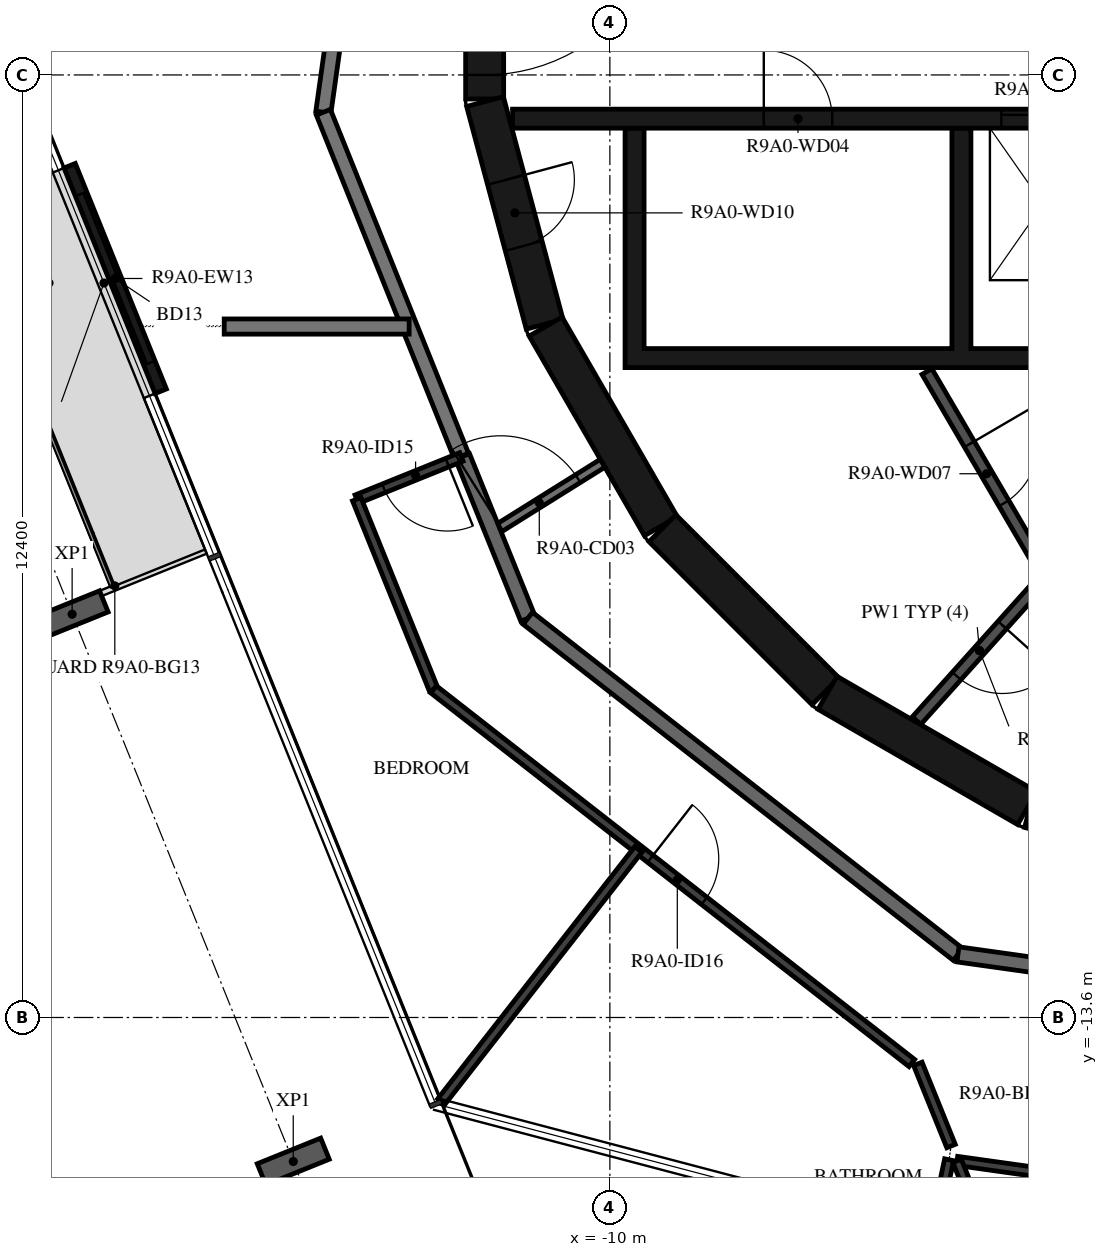
"""IFC4 building model, lengths in metres.
Left out: names, types, materials, properties, quantities, classifications, styles, units other than length and angle.
Written with IfcOpenShell. Run it as: python <this file> out.ifc"""

import sys

from ifc_helpers import new_model, si_unit, direction, frame, frame_2d, origin, origin_2d, place, context, subcontext, project, spatial, polyline, rectangle, i_section, outline, extrude, element, fill, save


model = new_model("IFC4")
c1 = context("Model", 3, precision=1e-05, world=origin(), true_north=direction((0.0, 1.0)))
c2 = subcontext(c1, "Body", "Model", "MODEL_VIEW")
j1 = project(units=[si_unit("LENGTHUNIT", "METRE"), si_unit("PLANEANGLEUNIT", "RADIAN")], contexts=[c1])
p1 = place(None, origin())
s1 = spatial("IfcSite", under=j1, at=p1, CompositionType="ELEMENT")
p2 = place(p1, origin())
s2 = spatial("IfcBuilding", under=s1, at=p2, CompositionType="ELEMENT")
p3 = place(p2, frame((0.0, 0.0, 340.0)))
s3 = spatial("IfcBuildingStorey", under=s2, at=p3, CompositionType="ELEMENT", Elevation=340.0)
for number, where, z_axis, x_axis in (
    (1, (-17.075, -8.294, -0.38), (0.0, 0.0, 1.0), (-0.375, 0.927, 0.0)),
    (2, (-14.166, -15.495, -0.38), (0.0, 0.0, 1.0), (-0.375, 0.927, 0.0)),
):
    element("IfcColumn", number, at=place(p3, frame(where, z_axis=z_axis, x_axis=x_axis)), inside=s3, PredefinedType="COLUMN", context=c2, shape_type="SweptSolid", body=[
        extrude(i_section(OverallWidth=0.3, OverallDepth=0.9, WebThickness=0.019, FlangeThickness=0.035, FilletRadius=0.03, at=origin_2d()), origin(), (0.0, 0.0, 1.0), 3.5),
    ])
p4 = place(p3, frame((-17.107, -2.394, 0.0), z_axis=(0.0, 0.0, 1.0), x_axis=(0.374598019739, -0.927187318511, 0.0)))
e3 = element("IfcWall", 3, at=p4, inside=s3, PredefinedType="STANDARD", context=c2, shape_type="SweptSolid", body=[
    extrude(rectangle(XDim=3.2, YDim=0.16, at=frame_2d((1.6, 0.0))), origin(), (0.0, 0.0, 1.0), 3.12),
])
p5 = place(p4, frame((0.4, 0.0, 0.0)))
e4 = element("IfcOpeningElement", 4, at=p5, cuts=e3, PredefinedType="OPENING", context=c2, shape_type="SweptSolid", body=[
    extrude(rectangle(XDim=2.4, YDim=2.4, at=frame_2d((1.2, 1.2))), frame((0.0, 0.09, 0.0), z_axis=(0.0, -1.0, 0.0), x_axis=(1.0, 0.0, 0.0)), (0.0, 0.0, 1.0), 0.18),
])
p6 = place(p3, frame((-11.647, 1.516, 0.0), z_axis=(0.0, 0.0, 1.0), x_axis=(0.0, -1.0, 0.0)))
e5 = element("IfcWall", 5, at=p6, inside=s3, PredefinedType="SHEAR", context=c2, shape_type="SweptSolid", body=[
    extrude(rectangle(XDim=3.033, YDim=0.5, at=frame_2d((1.516, 0.0))), origin(), (0.0, 0.0, 1.0), 3.12),
])
p7 = place(p6, frame((0.316, 0.0, 0.0)))
e6 = element("IfcOpeningElement", 6, at=p7, cuts=e5, PredefinedType="OPENING", context=c2, shape_type="SweptSolid", body=[
    extrude(rectangle(XDim=2.4, YDim=2.1, at=frame_2d((1.2, 1.05))), frame((0.0, 0.26, 0.0), z_axis=(0.0, -1.0, 0.0), x_axis=(1.0, 0.0, 0.0)), (0.0, 0.0, 1.0), 0.52),
])
p8 = place(p3, frame((-11.643, -1.55, 0.0), z_axis=(0.0, 0.0, 1.0), x_axis=(0.258734743916, -0.965948410781, 0.0)))
e7 = element("IfcWall", 7, at=p8, inside=s3, PredefinedType="SHEAR", context=c2, shape_type="SweptSolid", body=[
    extrude(rectangle(XDim=3.033, YDim=0.5, at=frame_2d((1.516, 0.0))), origin(), (0.0, 0.0, 1.0), 3.12),
])
p9 = place(p8, frame((1.066, 0.0, 0.0)))
e8 = element("IfcOpeningElement", 8, at=p9, cuts=e7, PredefinedType="OPENING", context=c2, shape_type="SweptSolid", body=[
    extrude(rectangle(XDim=0.9, YDim=2.1, at=frame_2d((0.45, 1.05))), frame((0.0, 0.26, 0.0), z_axis=(0.0, -1.0, 0.0), x_axis=(1.0, 0.0, 0.0)), (0.0, 0.0, 1.0), 0.52),
])
p10 = place(p3, frame((-10.845, -4.51, 0.0), z_axis=(0.0, 0.0, 1.0), x_axis=(0.500087131594, -0.865975092491, 0.0)))
e9 = element("IfcWall", 9, at=p10, inside=s3, PredefinedType="SHEAR", context=c2, shape_type="SweptSolid", body=[
    extrude(rectangle(XDim=3.033, YDim=0.5, at=frame_2d((1.516, 0.0))), origin(), (0.0, 0.0, 1.0), 3.12),
])
p11 = place(p3, frame((-9.308, -7.164, 0.0), z_axis=(0.0, 0.0, 1.0), x_axis=(0.707106781187, -0.707106781187, 0.0)))
e10 = element("IfcWall", 10, at=p11, inside=s3, PredefinedType="SHEAR", context=c2, shape_type="SweptSolid", body=[
    extrude(rectangle(XDim=3.032, YDim=0.5, at=frame_2d((1.516, 0.0))), origin(), (0.0, 0.0, 1.0), 3.12),
])
for number, where, z_axis, x_axis in (
    (11, (-7.137, -9.329, 0.0), (0.0, 0.0, 1.0), (0.866, -0.5, 0.0)),
    (12, (-4.479, -10.858, 0.0), (0.0, 0.0, 1.0), (0.966, -0.259, 0.0)),
):
    element("IfcWall", number, at=place(p3, frame(where, z_axis=z_axis, x_axis=x_axis)), inside=s3, PredefinedType="SHEAR", context=c2, shape_type="SweptSolid", body=[
        extrude(rectangle(XDim=3.033, YDim=0.5, at=frame_2d((1.516, 0.0))), origin(), (0.0, 0.0, 1.0), 3.12),
    ])
p12 = place(p3, origin())
e13 = element("IfcWall", 13, at=p12, inside=s3, PredefinedType="SHEAR", context=c2, shape_type="SweptSolid", body=[
    extrude(outline(polyline([(9.8, -5.05), (9.8, -4.8), (9.8, -1.9), (9.55, -1.9), (9.55, -4.8), (7.65, -4.8), (7.65, -1.9), (7.4, -1.9), (7.4, -4.8), (5.5, -4.8), (5.5, -1.9), (5.25, -1.9), (5.25, -4.8), (3.35, -4.8), (3.35, -1.9), (3.1, -1.9), (3.1, -4.8), (1.2, -4.8), (1.2, -1.9), (0.95, -1.9), (0.95, -4.8), (-0.95, -4.8), (-0.95, -1.9), (-1.2, -1.9), (-1.2, -4.8), (-3.1, -4.8), (-3.1, -1.9), (-3.35, -1.9), (-3.35, -4.8), (-5.25, -4.8), (-5.25, -1.9), (-5.5, -1.9), (-5.5, -4.8), (-9.55, -4.8), (-9.55, -1.9), (-9.8, -1.9), (-9.8, -4.8), (-9.8, -5.05), (9.8, -5.05)])), origin(), (0.0, 0.0, 1.0), 3.12),
])
p13 = place(p3, frame((-11.28, -1.775, 0.0), z_axis=(0.0, 0.0, 1.0), x_axis=(1.0, 0.0, 0.0)))
e14 = element("IfcWall", 14, at=p13, inside=s3, PredefinedType="SHEAR", context=c2, shape_type="SweptSolid", body=[
    extrude(rectangle(XDim=14.38, YDim=0.25, at=frame_2d((7.19, 0.0))), origin(), (0.0, 0.0, 1.0), 3.12),
])
p14 = place(p13, frame((6.43, 0.0, 0.0)))
e15 = element("IfcOpeningElement", 15, at=p14, cuts=e14, PredefinedType="OPENING", context=c2, shape_type="SweptSolid", body=[
    extrude(rectangle(XDim=1.1, YDim=2.1, at=frame_2d((0.55, 1.05))), frame((0.0, 0.135, 0.0), z_axis=(0.0, -1.0, 0.0), x_axis=(1.0, 0.0, 0.0)), (0.0, 0.0, 1.0), 0.27),
])
p15 = place(p13, frame((8.58, 0.0, 0.0)))
e16 = element("IfcOpeningElement", 16, at=p15, cuts=e14, PredefinedType="OPENING", context=c2, shape_type="SweptSolid", body=[
    extrude(rectangle(XDim=1.1, YDim=2.1, at=frame_2d((0.55, 1.05))), frame((0.0, 0.135, 0.0), z_axis=(0.0, -1.0, 0.0), x_axis=(1.0, 0.0, 0.0)), (0.0, 0.0, 1.0), 0.27),
])
p16 = place(p13, frame((10.73, 0.0, 0.0)))
e17 = element("IfcOpeningElement", 17, at=p16, cuts=e14, PredefinedType="OPENING", context=c2, shape_type="SweptSolid", body=[
    extrude(rectangle(XDim=1.1, YDim=2.1, at=frame_2d((0.55, 1.05))), frame((0.0, 0.135, 0.0), z_axis=(0.0, -1.0, 0.0), x_axis=(1.0, 0.0, 0.0)), (0.0, 0.0, 1.0), 0.27),
])
p17 = place(p13, frame((3.305, 0.0, 0.0)))
e18 = element("IfcOpeningElement", 18, at=p17, cuts=e14, PredefinedType="OPENING", context=c2, shape_type="SweptSolid", body=[
    extrude(rectangle(XDim=0.9, YDim=2.1, at=frame_2d((0.45, 1.05))), frame((0.0, 0.135, 0.0), z_axis=(0.0, -1.0, 0.0), x_axis=(1.0, 0.0, 0.0)), (0.0, 0.0, 1.0), 0.27),
])
p18 = place(p13, frame((12.98, 0.0, 0.0)))
e19 = element("IfcOpeningElement", 19, at=p18, cuts=e14, PredefinedType="OPENING", context=c2, shape_type="SweptSolid", body=[
    extrude(rectangle(XDim=0.9, YDim=2.1, at=frame_2d((0.45, 1.05))), frame((0.0, 0.135, 0.0), z_axis=(0.0, -1.0, 0.0), x_axis=(1.0, 0.0, 0.0)), (0.0, 0.0, 1.0), 0.27),
])
p19 = place(p3, frame((-5.829, -5.102, 0.0), z_axis=(0.0, 0.0, 1.0), x_axis=(0.504480008384, -0.863423373057, 0.0)))
e20 = element("IfcWall", 20, at=p19, inside=s3, PredefinedType="PARTITIONING", context=c2, shape_type="SweptSolid", body=[
    extrude(rectangle(XDim=3.115, YDim=0.15, at=frame_2d((1.558, 0.0))), origin(), (0.0, 0.0, 1.0), 3.12),
])
p20 = place(p19, frame((1.107, 0.0, 0.0)))
e21 = element("IfcOpeningElement", 21, at=p20, cuts=e20, PredefinedType="OPENING", context=c2, shape_type="SweptSolid", body=[
    extrude(rectangle(XDim=0.9, YDim=2.1, at=frame_2d((0.45, 1.05))), frame((0.0, 0.085, 0.0), z_axis=(0.0, -1.0, 0.0), x_axis=(1.0, 0.0, 0.0)), (0.0, 0.0, 1.0), 0.17),
])
p21 = place(p3, frame((-4.311, -7.851, 0.0), z_axis=(0.0, 0.0, 1.0), x_axis=(-0.667869133096, -0.744278725383, 0.0)))
e22 = element("IfcWall", 22, at=p21, inside=s3, PredefinedType="PARTITIONING", context=c2, shape_type="SweptSolid", body=[
    extrude(rectangle(XDim=2.476, YDim=0.15, at=frame_2d((1.238, 0.0))), origin(), (0.0, 0.0, 1.0), 3.12),
])
p22 = place(p21, frame((0.788, 0.0, 0.0)))
e23 = element("IfcOpeningElement", 23, at=p22, cuts=e22, PredefinedType="OPENING", context=c2, shape_type="SweptSolid", body=[
    extrude(rectangle(XDim=0.9, YDim=2.1, at=frame_2d((0.45, 1.05))), frame((0.0, 0.085, 0.0), z_axis=(0.0, -1.0, 0.0), x_axis=(1.0, 0.0, 0.0)), (0.0, 0.0, 1.0), 0.17),
])
p23 = place(p3, frame((-11.539, -7.21, 0.0), z_axis=(0.0, 0.0, 1.0), x_axis=(0.848103039868, 0.529831325769, 0.0)))
e24 = element("IfcWall", 24, at=p23, inside=s3, PredefinedType="PARTITIONING", context=c2, shape_type="SweptSolid", body=[
    extrude(rectangle(XDim=1.702, YDim=0.12, at=frame_2d((0.851, 0.0))), origin(), (0.0, 0.0, 1.0), 3.12),
])
p24 = place(p23, frame((0.12, 0.0, 0.0)))
e25 = element("IfcOpeningElement", 25, at=p24, cuts=e24, PredefinedType="OPENING", context=c2, shape_type="SweptSolid", body=[
    extrude(rectangle(XDim=1.2, YDim=2.1, at=frame_2d((0.6, 1.05))), frame((0.0, 0.07, 0.0), z_axis=(0.0, -1.0, 0.0), x_axis=(1.0, 0.0, 0.0)), (0.0, 0.0, 1.0), 0.14),
])
p25 = place(p3, frame((-12.77, 5.42, 0.0), z_axis=(0.0, 0.0, 1.0), x_axis=(-0.139155334385, -0.990270565508, 0.0)))
e26 = element("IfcWall", 26, at=p25, inside=s3, PredefinedType="STANDARD", context=c2, shape_type="SweptSolid", body=[
    extrude(rectangle(XDim=7.181, YDim=0.2, at=frame_2d((3.59, 0.0))), origin(), (0.0, 0.0, 1.0), 3.12),
])
p26 = place(p25, frame((1.055, 0.0, 0.0)))
e27 = element("IfcOpeningElement", 27, at=p26, cuts=e26, PredefinedType="OPENING", context=c2, shape_type="SweptSolid", body=[
    extrude(rectangle(XDim=1.8, YDim=2.1, at=frame_2d((0.9, 1.05))), frame((0.0, 0.11, 0.0), z_axis=(0.0, -1.0, 0.0), x_axis=(1.0, 0.0, 0.0)), (0.0, 0.0, 1.0), 0.22),
])
p27 = place(p3, frame((-13.769, -1.691, 0.0), z_axis=(0.0, 0.0, 1.0), x_axis=(0.372720094028, -0.927943819155, 0.0)))
e28 = element("IfcWall", 28, at=p27, inside=s3, PredefinedType="STANDARD", context=c2, shape_type="SweptSolid", body=[
    extrude(rectangle(XDim=4.875, YDim=0.2, at=frame_2d((2.438, 0.0))), origin(), (0.0, 0.0, 1.0), 3.12),
])
p28 = place(p3, frame((-11.939, -6.22, 0.0), z_axis=(0.0, 0.0, 1.0), x_axis=(0.374651128394, -0.927165860024, 0.0)))
e29 = element("IfcWall", 29, at=p28, inside=s3, PredefinedType="STANDARD", context=c2, shape_type="SweptSolid", body=[
    extrude(rectangle(XDim=2.296, YDim=0.2, at=frame_2d((1.148, 0.0))), origin(), (0.0, 0.0, 1.0), 3.12),
])
p29 = place(p3, frame((-11.079, -8.349, 0.0), z_axis=(0.0, 0.0, 1.0), x_axis=(0.78800478687, -0.615669112324, 0.0)))
e30 = element("IfcWall", 30, at=p29, inside=s3, PredefinedType="STANDARD", context=c2, shape_type="SweptSolid", body=[
    extrude(rectangle(XDim=7.181, YDim=0.2, at=frame_2d((3.591, 0.0))), origin(), (0.0, 0.0, 1.0), 3.12),
])
p30 = place(p3, frame((-5.42, -12.77, 0.0), z_axis=(0.0, 0.0, 1.0), x_axis=(0.990270565508, -0.139155334385, 0.0)))
e31 = element("IfcWall", 31, at=p30, inside=s3, PredefinedType="STANDARD", context=c2, shape_type="SweptSolid", body=[
    extrude(rectangle(XDim=7.181, YDim=0.2, at=frame_2d((3.59, 0.0))), origin(), (0.0, 0.0, 1.0), 3.12),
])
p31 = place(p30, frame((2.39, 0.0, 0.0)))
e32 = element("IfcOpeningElement", 32, at=p31, cuts=e31, PredefinedType="OPENING", context=c2, shape_type="SweptSolid", body=[
    extrude(rectangle(XDim=1.0, YDim=2.1, at=frame_2d((0.5, 1.05))), frame((0.0, 0.11, 0.0), z_axis=(0.0, -1.0, 0.0), x_axis=(1.0, 0.0, 0.0)), (0.0, 0.0, 1.0), 0.22),
])
p32 = place(p30, frame((4.091, 0.0, 0.0)))
e33 = element("IfcOpeningElement", 33, at=p32, cuts=e31, PredefinedType="OPENING", context=c2, shape_type="SweptSolid", body=[
    extrude(rectangle(XDim=1.0, YDim=2.1, at=frame_2d((0.5, 1.05))), frame((0.0, 0.11, 0.0), z_axis=(0.0, -1.0, 0.0), x_axis=(1.0, 0.0, 0.0)), (0.0, 0.0, 1.0), 0.22),
])
p33 = place(p3, frame((-15.074, -4.51, 0.0), z_axis=(0.0, 0.0, 1.0), x_axis=(1.0, 0.0, 0.0)))
e34 = element("IfcWall", 34, at=p33, inside=s3, PredefinedType="STANDARD", context=c2, shape_type="SweptSolid", body=[
    extrude(rectangle(XDim=2.433, YDim=0.2, at=frame_2d((1.216, 0.0))), origin(), (0.0, 0.0, 1.0), 3.12),
])
p34 = place(p3, frame((-11.953, -6.225, 0.0), z_axis=(0.0, 0.0, 1.0), x_axis=(-0.927144096717, -0.374704982518, 0.0)))
e35 = element("IfcWall", 35, at=p34, inside=s3, PredefinedType="PARTITIONING", context=c2, shape_type="SweptSolid", body=[
    extrude(rectangle(XDim=1.485, YDim=0.12, at=frame_2d((0.742, 0.0))), origin(), (0.0, 0.0, 1.0), 3.12),
])
p35 = place(p34, frame((0.2, 0.0, 0.0)))
e36 = element("IfcOpeningElement", 36, at=p35, cuts=e35, PredefinedType="OPENING", context=c2, shape_type="SweptSolid", body=[
    extrude(rectangle(XDim=0.9, YDim=2.1, at=frame_2d((0.45, 1.05))), frame((0.0, 0.07, 0.0), z_axis=(0.0, -1.0, 0.0), x_axis=(1.0, 0.0, 0.0)), (0.0, 0.0, 1.0), 0.14),
])
p36 = place(p3, frame((-13.33, -6.782, 0.0), z_axis=(0.0, 0.0, 1.0), x_axis=(0.374602180132, -0.927185637637, 0.0)))
e37 = element("IfcWall", 37, at=p36, inside=s3, PredefinedType="PARTITIONING", context=c2, shape_type="SweptSolid", body=[
    extrude(rectangle(XDim=2.698, YDim=0.12, at=frame_2d((1.349, 0.0))), origin(), (0.0, 0.0, 1.0), 3.12),
])
p37 = place(p3, frame((-12.319, -9.283, 0.0), z_axis=(0.0, 0.0, 1.0), x_axis=(0.788000268464, -0.61567489546, 0.0)))
e38 = element("IfcWall", 38, at=p37, inside=s3, PredefinedType="PARTITIONING", context=c2, shape_type="SweptSolid", body=[
    extrude(rectangle(XDim=7.985, YDim=0.12, at=frame_2d((3.992, 0.0))), origin(), (0.0, 0.0, 1.0), 3.12),
])
p38 = place(p37, frame((3.619, 0.0, 0.0)))
e39 = element("IfcOpeningElement", 39, at=p38, cuts=e38, PredefinedType="OPENING", context=c2, shape_type="SweptSolid", body=[
    extrude(rectangle(XDim=0.9, YDim=2.1, at=frame_2d((0.45, 1.05))), frame((0.0, 0.07, 0.0), z_axis=(0.0, -1.0, 0.0), x_axis=(1.0, 0.0, 0.0)), (0.0, 0.0, 1.0), 0.14),
])
p39 = place(p3, frame((-5.948, -14.21, 0.0), z_axis=(0.0, 0.0, 1.0), x_axis=(0.374601530156, -0.927185900241, 0.0)))
e40 = element("IfcWall", 40, at=p39, inside=s3, PredefinedType="PARTITIONING", context=c2, shape_type="SweptSolid", body=[
    extrude(rectangle(XDim=1.166, YDim=0.12, at=frame_2d((0.583, 0.0))), origin(), (0.0, 0.0, 1.0), 3.12),
])
p40 = place(p3, frame((-5.433, -15.487, 0.0), z_axis=(0.0, 0.0, 1.0), x_axis=(0.990268451053, -0.139170380644, 0.0)))
e41 = element("IfcWall", 41, at=p40, inside=s3, PredefinedType="PARTITIONING", context=c2, shape_type="SweptSolid", body=[
    extrude(rectangle(XDim=1.595, YDim=0.12, at=frame_2d((0.797, 0.0))), origin(), (0.0, 0.0, 1.0), 3.12),
])
p41 = place(p3, frame((-12.219, -14.708, 0.0), z_axis=(0.0, 0.0, 1.0), x_axis=(0.615656413137, 0.788014708596, 0.0)))
e42 = element("IfcWall", 42, at=p41, inside=s3, PredefinedType="PARTITIONING", context=c2, shape_type="SweptSolid", body=[
    extrude(rectangle(XDim=4.213, YDim=0.12, at=frame_2d((2.106, 0.0))), origin(), (0.0, 0.0, 1.0), 3.12),
])
p42 = place(p3, frame((-7.305, -23.815, 0.0), z_axis=(0.0, 0.0, 1.0), x_axis=(0.207366409306, 0.978263345062, 0.0)))
e43 = element("IfcWall", 43, at=p42, inside=s3, PredefinedType="PARTITIONING", context=c2, shape_type="SweptSolid", body=[
    extrude(rectangle(XDim=8.529, YDim=0.12, at=frame_2d((4.264, 0.0))), origin(), (0.0, 0.0, 1.0), 3.12),
])
p43 = place(p42, frame((0.4, 0.0, 0.0)))
e44 = element("IfcOpeningElement", 44, at=p43, cuts=e43, PredefinedType="OPENING", context=c2, shape_type="SweptSolid", body=[
    extrude(rectangle(XDim=0.9, YDim=2.1, at=frame_2d((0.45, 1.05))), frame((0.0, 0.07, 0.0), z_axis=(0.0, -1.0, 0.0), x_axis=(1.0, 0.0, 0.0)), (0.0, 0.0, 1.0), 0.14),
])
p44 = place(p3, frame((-4.445, -17.93, 0.0), z_axis=(0.0, 0.0, 1.0), x_axis=(-0.374614676827, 0.927180588616, 0.0)))
e45 = element("IfcWall", 45, at=p44, inside=s3, PredefinedType="PARTITIONING", context=c2, shape_type="SweptSolid", body=[
    extrude(rectangle(XDim=2.635, YDim=0.12, at=frame_2d((1.318, 0.0))), origin(), (0.0, 0.0, 1.0), 3.12),
])
p45 = place(p5, origin())
e46 = element("IfcDoor", 46, at=p45, inside=s3, OperationType="DOUBLE_DOOR_SLIDING", PredefinedType="DOOR", context=c2, shape_type="SweptSolid", body=[
    extrude(rectangle(XDim=2.4, YDim=2.4, at=frame_2d((1.2, 1.2))), frame((0.0, 0.025, 0.0), z_axis=(0.0, -1.0, 0.0), x_axis=(1.0, 0.0, 0.0)), (0.0, 0.0, 1.0), 0.05),
])
fill(e4, e46)
p46 = place(p7, origin())
e47 = element("IfcDoor", 47, at=p46, inside=s3, OperationType="DOUBLE_DOOR_SINGLE_SWING", PredefinedType="DOOR", context=c2, shape_type="SweptSolid", body=[
    extrude(rectangle(XDim=2.4, YDim=2.1, at=frame_2d((1.2, 1.05))), frame((0.0, 0.025, 0.0), z_axis=(0.0, -1.0, 0.0), x_axis=(1.0, 0.0, 0.0)), (0.0, 0.0, 1.0), 0.05),
])
fill(e6, e47)
p47 = place(p14, origin())
e48 = element("IfcDoor", 48, at=p47, inside=s3, OperationType="DOUBLE_DOOR_SLIDING", PredefinedType="DOOR", context=c2, shape_type="SweptSolid", body=[
    extrude(rectangle(XDim=1.1, YDim=2.1, at=frame_2d((0.55, 1.05))), frame((0.0, 0.025, 0.0), z_axis=(0.0, -1.0, 0.0), x_axis=(1.0, 0.0, 0.0)), (0.0, 0.0, 1.0), 0.05),
])
fill(e15, e48)
p48 = place(p17, origin())
e49 = element("IfcDoor", 49, at=p48, inside=s3, OperationType="SINGLE_SWING_RIGHT", PredefinedType="DOOR", context=c2, shape_type="SweptSolid", body=[
    extrude(rectangle(XDim=0.9, YDim=2.1, at=frame_2d((0.45, 1.05))), frame((0.0, 0.025, 0.0), z_axis=(0.0, -1.0, 0.0), x_axis=(1.0, 0.0, 0.0)), (0.0, 0.0, 1.0), 0.05),
])
fill(e18, e49)
p49 = place(p22, origin())
e50 = element("IfcDoor", 50, at=p49, inside=s3, OperationType="SINGLE_SWING_RIGHT", PredefinedType="DOOR", context=c2, shape_type="SweptSolid", body=[
    extrude(rectangle(XDim=0.9, YDim=2.1, at=frame_2d((0.45, 1.05))), frame((0.0, 0.025, 0.0), z_axis=(0.0, -1.0, 0.0), x_axis=(1.0, 0.0, 0.0)), (0.0, 0.0, 1.0), 0.05),
])
fill(e23, e50)
p50 = place(p20, origin())
e51 = element("IfcDoor", 51, at=p50, inside=s3, OperationType="SINGLE_SWING_LEFT", PredefinedType="DOOR", context=c2, shape_type="SweptSolid", body=[
    extrude(rectangle(XDim=0.9, YDim=2.1, at=frame_2d((0.45, 1.05))), frame((0.0, 0.025, 0.0), z_axis=(0.0, -1.0, 0.0), x_axis=(1.0, 0.0, 0.0)), (0.0, 0.0, 1.0), 0.05),
])
fill(e21, e51)
p51 = place(p9, origin())
e52 = element("IfcDoor", 52, at=p51, inside=s3, OperationType="SINGLE_SWING_RIGHT", PredefinedType="DOOR", context=c2, shape_type="SweptSolid", body=[
    extrude(rectangle(XDim=0.9, YDim=2.1, at=frame_2d((0.45, 1.05))), frame((0.0, 0.025, 0.0), z_axis=(0.0, -1.0, 0.0), x_axis=(1.0, 0.0, 0.0)), (0.0, 0.0, 1.0), 0.05),
])
fill(e8, e52)
p52 = place(p35, origin())
e53 = element("IfcDoor", 53, at=p52, inside=s3, OperationType="SINGLE_SWING_LEFT", PredefinedType="DOOR", context=c2, shape_type="SweptSolid", body=[
    extrude(rectangle(XDim=0.9, YDim=2.1, at=frame_2d((0.45, 1.05))), frame((0.0, 0.025, 0.0), z_axis=(0.0, -1.0, 0.0), x_axis=(1.0, 0.0, 0.0)), (0.0, 0.0, 1.0), 0.05),
])
fill(e36, e53)
p53 = place(p38, origin())
e54 = element("IfcDoor", 54, at=p53, inside=s3, OperationType="SINGLE_SWING_RIGHT", PredefinedType="DOOR", context=c2, shape_type="SweptSolid", body=[
    extrude(rectangle(XDim=0.9, YDim=2.1, at=frame_2d((0.45, 1.05))), frame((0.0, 0.025, 0.0), z_axis=(0.0, -1.0, 0.0), x_axis=(1.0, 0.0, 0.0)), (0.0, 0.0, 1.0), 0.05),
])
fill(e39, e54)
p54 = place(p24, origin())
e55 = element("IfcDoor", 55, at=p54, inside=s3, OperationType="DOUBLE_DOOR_SINGLE_SWING", PredefinedType="DOOR", context=c2, shape_type="SweptSolid", body=[
    extrude(rectangle(XDim=1.2, YDim=2.1, at=frame_2d((0.6, 1.05))), frame((0.0, 0.025, 0.0), z_axis=(0.0, -1.0, 0.0), x_axis=(1.0, 0.0, 0.0)), (0.0, 0.0, 1.0), 0.05),
])
fill(e25, e55)
save(model, sys.argv[1])
